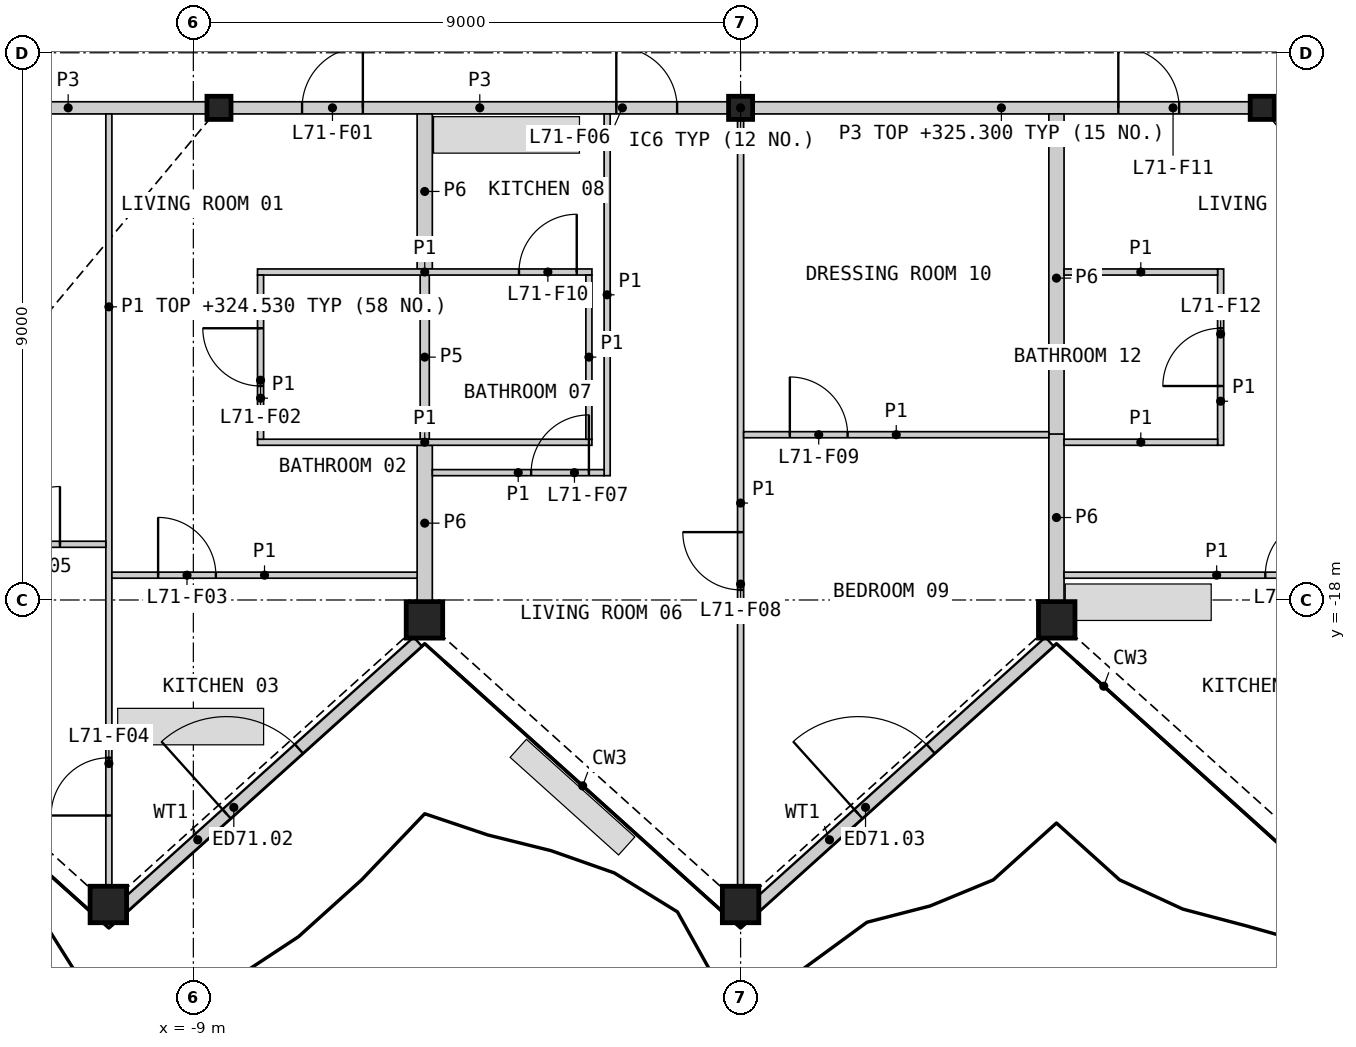
"""IFC4 building model, lengths in metres.
Left out: names, types, materials, properties, quantities, classifications, styles, units other than length and angle.
Written with IfcOpenShell. Run it as: python <this file> out.ifc"""

import sys

from ifc_helpers import new_model, si_unit, direction, frame, frame_2d, origin, origin_2d, place, context, subcontext, project, spatial, rectangle, hollow_rectangle, i_section, extrude, element, fill, save


model = new_model("IFC4")
c1 = context("Model", 3, precision=1e-05, world=origin(), true_north=direction((0.0, 1.0)))
c2 = subcontext(c1, "Body", "Model", "MODEL_VIEW")
j1 = project(units=[si_unit("LENGTHUNIT", "METRE"), si_unit("PLANEANGLEUNIT", "RADIAN")], contexts=[c1])
p1 = place(None, origin())
s1 = spatial("IfcSite", under=j1, at=p1, CompositionType="ELEMENT")
p2 = place(p1, origin())
s2 = spatial("IfcBuilding", under=s1, at=p2, CompositionType="ELEMENT")
p3 = place(p2, frame((0.0, 0.0, 322.2)))
s3 = spatial("IfcBuildingStorey", under=s2, at=p3, CompositionType="ELEMENT", Elevation=322.2)
for number, where, z_axis, x_axis in (
    (1, (-10.398, -23.008, 0.0), (0.0, 0.0, 1.0), (1.0, 0.0, 0.0)),
    (2, (-5.199, -18.327, 0.0), (0.0, 0.0, 1.0), (1.0, 0.0, 0.0)),
    (3, (0.0, -23.008, 0.0), (0.0, 0.0, 1.0), (1.0, 0.0, 0.0)),
    (4, (5.199, -18.327, 0.0), (0.0, 0.0, 1.0), (1.0, 0.0, 0.0)),
):
    element("IfcColumn", number, at=place(p3, frame(where, z_axis=z_axis, x_axis=x_axis)), inside=s3, PredefinedType="COLUMN", context=c2, shape_type="SweptSolid", body=[
        extrude(hollow_rectangle(XDim=0.6, YDim=0.6, WallThickness=0.04, at=origin_2d()), origin(), (0.0, 0.0, 1.0), 3.4),
    ])
for number, where, z_axis, x_axis in (
    (5, (-8.578, -9.906, 0.0), (0.0, 0.0, 1.0), (1.0, 0.0, 0.0)),
    (6, (0.0, -9.906, 0.0), (0.0, 0.0, 1.0), (1.0, 0.0, 0.0)),
    (7, (8.578, -9.906, 0.0), (0.0, 0.0, 1.0), (1.0, 0.0, 0.0)),
):
    element("IfcColumn", number, at=place(p3, frame(where, z_axis=z_axis, x_axis=x_axis)), inside=s3, PredefinedType="COLUMN", context=c2, shape_type="SweptSolid", body=[
        extrude(i_section(OverallWidth=0.396, OverallDepth=0.381, WebThickness=0.019, FlangeThickness=0.03, at=origin_2d()), origin(), (0.0, 0.0, 1.0), 3.4),
    ])
p4 = place(p3, frame((-10.134, -23.031, 0.0), z_axis=(0.0, 0.0, 1.0), x_axis=(0.743138937876, 0.669137145145, 0.0)))
e8 = element("IfcWall", 8, at=p4, inside=s3, PredefinedType="SOLIDWALL", context=c2, shape_type="SweptSolid", body=[
    extrude(rectangle(XDim=6.493, YDim=0.2, at=frame_2d((3.246, 0.0))), origin(), (0.0, 0.0, 1.0), 2.488),
])
p5 = place(p4, frame((2.261, 0.0, 0.0)))
e9 = element("IfcOpeningElement", 9, at=p5, cuts=e8, PredefinedType="OPENING", context=c2, shape_type="SweptSolid", body=[
    extrude(rectangle(XDim=1.6, YDim=2.25, at=frame_2d((0.8, 1.125))), frame((0.0, 0.11, 0.0), z_axis=(0.0, -1.0, 0.0), x_axis=(1.0, 0.0, 0.0)), (0.0, 0.0, 1.0), 0.22),
])
p6 = place(p3, frame((0.256, -23.031, 0.0), z_axis=(0.0, 0.0, 1.0), x_axis=(0.743138937876, 0.669137145145, 0.0)))
e10 = element("IfcWall", 10, at=p6, inside=s3, PredefinedType="SOLIDWALL", context=c2, shape_type="SweptSolid", body=[
    extrude(rectangle(XDim=6.493, YDim=0.2, at=frame_2d((3.246, 0.0))), origin(), (0.0, 0.0, 1.0), 2.488),
])
p7 = place(p6, frame((2.261, 0.0, 0.0)))
e11 = element("IfcOpeningElement", 11, at=p7, cuts=e10, PredefinedType="OPENING", context=c2, shape_type="SweptSolid", body=[
    extrude(rectangle(XDim=1.6, YDim=2.25, at=frame_2d((0.8, 1.125))), frame((0.0, 0.11, 0.0), z_axis=(0.0, -1.0, 0.0), x_axis=(1.0, 0.0, 0.0)), (0.0, 0.0, 1.0), 0.22),
])
p8 = place(p3, frame((0.208, -9.906, 0.0), z_axis=(0.0, 0.0, 1.0), x_axis=(1.0, 0.0, 0.0)))
e12 = element("IfcWall", 12, at=p8, inside=s3, PredefinedType="PARTITIONING", context=c2, shape_type="SweptSolid", body=[
    extrude(rectangle(XDim=8.163, YDim=0.2, at=frame_2d((4.082, 0.0))), origin(), (0.0, 0.0, 1.0), 3.1),
])
p9 = place(p8, frame((6.004, 0.0, 0.0)))
e13 = element("IfcOpeningElement", 13, at=p9, cuts=e12, PredefinedType="OPENING", context=c2, shape_type="SweptSolid", body=[
    extrude(rectangle(XDim=1.0, YDim=2.1, at=frame_2d((0.5, 1.05))), frame((0.0, 0.11, 0.0), z_axis=(0.0, -1.0, 0.0), x_axis=(1.0, 0.0, 0.0)), (0.0, 0.0, 1.0), 0.22),
])
p10 = place(p3, frame((-8.371, -9.906, 0.0), z_axis=(0.0, 0.0, 1.0), x_axis=(1.0, 0.0, 0.0)))
e14 = element("IfcWall", 14, at=p10, inside=s3, PredefinedType="PARTITIONING", context=c2, shape_type="SweptSolid", body=[
    extrude(rectangle(XDim=8.163, YDim=0.2, at=frame_2d((4.082, 0.0))), origin(), (0.0, 0.0, 1.0), 3.1),
])
p11 = place(p10, frame((1.159, 0.0, 0.0)))
e15 = element("IfcOpeningElement", 15, at=p11, cuts=e14, PredefinedType="OPENING", context=c2, shape_type="SweptSolid", body=[
    extrude(rectangle(XDim=1.0, YDim=2.1, at=frame_2d((0.5, 1.05))), frame((0.0, 0.11, 0.0), z_axis=(0.0, -1.0, 0.0), x_axis=(1.0, 0.0, 0.0)), (0.0, 0.0, 1.0), 0.22),
])
p12 = place(p10, frame((6.327, 0.0, 0.0)))
e16 = element("IfcOpeningElement", 16, at=p12, cuts=e14, PredefinedType="OPENING", context=c2, shape_type="SweptSolid", body=[
    extrude(rectangle(XDim=1.0, YDim=2.1, at=frame_2d((0.5, 1.05))), frame((0.0, 0.11, 0.0), z_axis=(0.0, -1.0, 0.0), x_axis=(1.0, 0.0, 0.0)), (0.0, 0.0, 1.0), 0.22),
])
p13 = place(p3, frame((5.195, -15.407, 0.0), z_axis=(0.0, 0.0, 1.0), x_axis=(0.0, 1.0, 0.0)))
e17 = element("IfcWall", 17, at=p13, inside=s3, PredefinedType="PARTITIONING", context=c2, shape_type="SweptSolid", body=[
    extrude(rectangle(XDim=5.401, YDim=0.25, at=frame_2d((2.701, 0.0))), origin(), (0.0, 0.0, 1.0), 2.33),
])
for number, where, z_axis, x_axis in (
    (18, (-13.331, -9.906, 0.0), (0.0, 0.0, 1.0), (1.0, 0.0, 0.0)),
    (19, (8.786, -9.906, 0.0), (0.0, 0.0, 1.0), (1.0, 0.0, 0.0)),
):
    element("IfcWall", number, at=place(p3, frame(where, z_axis=z_axis, x_axis=x_axis)), inside=s3, PredefinedType="PARTITIONING", context=c2, shape_type="SweptSolid", body=[
        extrude(rectangle(XDim=4.545, YDim=0.2, at=frame_2d((2.272, 0.0))), origin(), (0.0, 0.0, 1.0), 3.1),
    ])
p14 = place(p3, frame((-5.195, -12.556, 0.0), z_axis=(0.0, 0.0, 1.0), x_axis=(0.0, 1.0, 0.0)))
e20 = element("IfcWall", 20, at=p14, inside=s3, PredefinedType="PARTITIONING", context=c2, shape_type="SweptSolid", body=[
    extrude(rectangle(XDim=2.55, YDim=0.25, at=frame_2d((1.275, 0.0))), origin(), (0.0, 0.0, 1.0), 2.33),
])
p15 = place(p3, frame((5.195, -18.017, 0.0), z_axis=(0.0, 0.0, 1.0), x_axis=(0.0, 1.0, 0.0)))
e21 = element("IfcWall", 21, at=p15, inside=s3, PredefinedType="PARTITIONING", context=c2, shape_type="SweptSolid", body=[
    extrude(rectangle(XDim=2.746, YDim=0.25, at=frame_2d((1.373, 0.0))), origin(), (0.0, 0.0, 1.0), 2.33),
])
p16 = place(p3, frame((-5.195, -18.017, 0.0), z_axis=(0.0, 0.0, 1.0), x_axis=(0.0, 1.0, 0.0)))
e22 = element("IfcWall", 22, at=p16, inside=s3, PredefinedType="PARTITIONING", context=c2, shape_type="SweptSolid", body=[
    extrude(rectangle(XDim=2.561, YDim=0.25, at=frame_2d((1.281, 0.0))), origin(), (0.0, 0.0, 1.0), 2.33),
])
p17 = place(p3, frame((-5.195, -15.356, 0.0), z_axis=(0.0, 0.0, 1.0), x_axis=(0.0, 1.0, 0.0)))
e23 = element("IfcWall", 23, at=p17, inside=s3, PredefinedType="PLUMBINGWALL", context=c2, shape_type="SweptSolid", body=[
    extrude(rectangle(XDim=2.7, YDim=0.15, at=frame_2d((1.35, 0.0))), origin(), (0.0, 0.0, 1.0), 2.33),
])
p18 = place(p3, frame((-10.389, -22.698, 0.0), z_axis=(0.0, 0.0, 1.0), x_axis=(0.0, 1.0, 0.0)))
e24 = element("IfcWall", 24, at=p18, inside=s3, PredefinedType="PARTITIONING", context=c2, shape_type="SweptSolid", body=[
    extrude(rectangle(XDim=12.692, YDim=0.1, at=frame_2d((6.346, 0.0))), origin(), (0.0, 0.0, 1.0), 2.33),
])
p19 = place(p18, frame((1.153, 0.0, 0.0)))
e25 = element("IfcOpeningElement", 25, at=p19, cuts=e24, PredefinedType="OPENING", context=c2, shape_type="SweptSolid", body=[
    extrude(rectangle(XDim=0.95, YDim=2.1, at=frame_2d((0.475, 1.05))), frame((0.0, 0.06, 0.0), z_axis=(0.0, -1.0, 0.0), x_axis=(1.0, 0.0, 0.0)), (0.0, 0.0, 1.0), 0.12),
])
p20 = place(p3, frame((0.0, -22.698, 0.0), z_axis=(0.0, 0.0, 1.0), x_axis=(0.0, 1.0, 0.0)))
e26 = element("IfcWall", 26, at=p20, inside=s3, PredefinedType="PARTITIONING", context=c2, shape_type="SweptSolid", body=[
    extrude(rectangle(XDim=12.585, YDim=0.1, at=frame_2d((6.292, 0.0))), origin(), (0.0, 0.0, 1.0), 2.33),
])
p21 = place(p20, frame((4.865, 0.0, 0.0)))
e27 = element("IfcOpeningElement", 27, at=p21, cuts=e26, PredefinedType="OPENING", context=c2, shape_type="SweptSolid", body=[
    extrude(rectangle(XDim=0.95, YDim=2.1, at=frame_2d((0.475, 1.05))), frame((0.0, 0.06, 0.0), z_axis=(0.0, -1.0, 0.0), x_axis=(1.0, 0.0, 0.0)), (0.0, 0.0, 1.0), 0.12),
])
p22 = place(p3, frame((-17.132, -17.084, 0.0), z_axis=(0.0, 0.0, 1.0), x_axis=(1.0, 0.0, 0.0)))
e28 = element("IfcWall", 28, at=p22, inside=s3, PredefinedType="PARTITIONING", context=c2, shape_type="SweptSolid", body=[
    extrude(rectangle(XDim=6.693, YDim=0.1, at=frame_2d((3.346, 0.0))), origin(), (0.0, 0.0, 1.0), 2.33),
])
p23 = place(p22, frame((4.989, 0.0, 0.0)))
e29 = element("IfcOpeningElement", 29, at=p23, cuts=e28, PredefinedType="OPENING", context=c2, shape_type="SweptSolid", body=[
    extrude(rectangle(XDim=0.95, YDim=2.1, at=frame_2d((0.475, 1.05))), frame((0.0, 0.06, 0.0), z_axis=(0.0, -1.0, 0.0), x_axis=(1.0, 0.0, 0.0)), (0.0, 0.0, 1.0), 0.12),
])
p24 = place(p3, frame((-2.195, -15.956, 0.0), z_axis=(0.0, 0.0, 1.0), x_axis=(0.0, 1.0, 0.0)))
e30 = element("IfcWall", 30, at=p24, inside=s3, PredefinedType="PARTITIONING", context=c2, shape_type="SweptSolid", body=[
    extrude(rectangle(XDim=5.95, YDim=0.1, at=frame_2d((2.975, 0.0))), origin(), (0.0, 0.0, 1.0), 2.33),
])
p25 = place(p3, frame((-7.945, -12.606, 0.0), z_axis=(0.0, 0.0, 1.0), x_axis=(1.0, 0.0, 0.0)))
e31 = element("IfcWall", 31, at=p25, inside=s3, PredefinedType="PARTITIONING", context=c2, shape_type="SweptSolid", body=[
    extrude(rectangle(XDim=5.5, YDim=0.1, at=frame_2d((2.75, 0.0))), origin(), (0.0, 0.0, 1.0), 2.33),
])
p26 = place(p25, frame((4.3, 0.0, 0.0)))
e32 = element("IfcOpeningElement", 32, at=p26, cuts=e31, PredefinedType="OPENING", context=c2, shape_type="SweptSolid", body=[
    extrude(rectangle(XDim=0.95, YDim=2.1, at=frame_2d((0.475, 1.05))), frame((0.0, 0.06, 0.0), z_axis=(0.0, -1.0, 0.0), x_axis=(1.0, 0.0, 0.0)), (0.0, 0.0, 1.0), 0.12),
])
p27 = place(p3, frame((-7.945, -15.406, 0.0), z_axis=(0.0, 0.0, 1.0), x_axis=(1.0, 0.0, 0.0)))
e33 = element("IfcWall", 33, at=p27, inside=s3, PredefinedType="PARTITIONING", context=c2, shape_type="SweptSolid", body=[
    extrude(rectangle(XDim=5.5, YDim=0.1, at=frame_2d((2.75, 0.0))), origin(), (0.0, 0.0, 1.0), 2.33),
])
p28 = place(p3, frame((-10.339, -17.592, 0.0), z_axis=(0.0, 0.0, 1.0), x_axis=(1.0, 0.0, 0.0)))
e34 = element("IfcWall", 34, at=p28, inside=s3, PredefinedType="PARTITIONING", context=c2, shape_type="SweptSolid", body=[
    extrude(rectangle(XDim=5.02, YDim=0.1, at=frame_2d((2.51, 0.0))), origin(), (0.0, 0.0, 1.0), 2.33),
])
p29 = place(p28, frame((0.76, 0.0, 0.0)))
e35 = element("IfcOpeningElement", 35, at=p29, cuts=e34, PredefinedType="OPENING", context=c2, shape_type="SweptSolid", body=[
    extrude(rectangle(XDim=0.95, YDim=2.1, at=frame_2d((0.475, 1.05))), frame((0.0, 0.06, 0.0), z_axis=(0.0, -1.0, 0.0), x_axis=(1.0, 0.0, 0.0)), (0.0, 0.0, 1.0), 0.12),
])
p30 = place(p3, frame((5.32, -17.592, 0.0), z_axis=(0.0, 0.0, 1.0), x_axis=(1.0, 0.0, 0.0)))
e36 = element("IfcWall", 36, at=p30, inside=s3, PredefinedType="PARTITIONING", context=c2, shape_type="SweptSolid", body=[
    extrude(rectangle(XDim=5.02, YDim=0.1, at=frame_2d((2.51, 0.0))), origin(), (0.0, 0.0, 1.0), 2.33),
])
p31 = place(p30, frame((3.31, 0.0, 0.0)))
e37 = element("IfcOpeningElement", 37, at=p31, cuts=e36, PredefinedType="OPENING", context=c2, shape_type="SweptSolid", body=[
    extrude(rectangle(XDim=0.95, YDim=2.1, at=frame_2d((0.475, 1.05))), frame((0.0, 0.06, 0.0), z_axis=(0.0, -1.0, 0.0), x_axis=(1.0, 0.0, 0.0)), (0.0, 0.0, 1.0), 0.12),
])
p32 = place(p3, frame((0.05, -15.282, 0.0), z_axis=(0.0, 0.0, 1.0), x_axis=(1.0, 0.0, 0.0)))
e38 = element("IfcWall", 38, at=p32, inside=s3, PredefinedType="PARTITIONING", context=c2, shape_type="SweptSolid", body=[
    extrude(rectangle(XDim=5.02, YDim=0.1, at=frame_2d((2.51, 0.0))), origin(), (0.0, 0.0, 1.0), 2.33),
])
p33 = place(p32, frame((0.76, 0.0, 0.0)))
e39 = element("IfcOpeningElement", 39, at=p33, cuts=e38, PredefinedType="OPENING", context=c2, shape_type="SweptSolid", body=[
    extrude(rectangle(XDim=0.95, YDim=2.1, at=frame_2d((0.475, 1.05))), frame((0.0, 0.06, 0.0), z_axis=(0.0, -1.0, 0.0), x_axis=(1.0, 0.0, 0.0)), (0.0, 0.0, 1.0), 0.12),
])
p34 = place(p3, frame((-5.07, -15.906, 0.0), z_axis=(0.0, 0.0, 1.0), x_axis=(1.0, 0.0, 0.0)))
e40 = element("IfcWall", 40, at=p34, inside=s3, PredefinedType="PARTITIONING", context=c2, shape_type="SweptSolid", body=[
    extrude(rectangle(XDim=2.825, YDim=0.1, at=frame_2d((1.413, 0.0))), origin(), (0.0, 0.0, 1.0), 2.33),
])
p35 = place(p34, frame((1.625, 0.0, 0.0)))
e41 = element("IfcOpeningElement", 41, at=p35, cuts=e40, PredefinedType="OPENING", context=c2, shape_type="SweptSolid", body=[
    extrude(rectangle(XDim=0.95, YDim=2.1, at=frame_2d((0.475, 1.05))), frame((0.0, 0.06, 0.0), z_axis=(0.0, -1.0, 0.0), x_axis=(1.0, 0.0, 0.0)), (0.0, 0.0, 1.0), 0.12),
])
p36 = place(p3, frame((-7.895, -15.356, 0.0), z_axis=(0.0, 0.0, 1.0), x_axis=(0.0, 1.0, 0.0)))
e42 = element("IfcWall", 42, at=p36, inside=s3, PredefinedType="PARTITIONING", context=c2, shape_type="SweptSolid", body=[
    extrude(rectangle(XDim=2.7, YDim=0.1, at=frame_2d((1.35, 0.0))), origin(), (0.0, 0.0, 1.0), 2.33),
])
p37 = place(p36, frame((0.875, 0.0, 0.0)))
e43 = element("IfcOpeningElement", 43, at=p37, cuts=e42, PredefinedType="OPENING", context=c2, shape_type="SweptSolid", body=[
    extrude(rectangle(XDim=0.95, YDim=2.1, at=frame_2d((0.475, 1.05))), frame((0.0, 0.06, 0.0), z_axis=(0.0, -1.0, 0.0), x_axis=(1.0, 0.0, 0.0)), (0.0, 0.0, 1.0), 0.12),
])
p38 = place(p3, frame((-2.495, -15.356, 0.0), z_axis=(0.0, 0.0, 1.0), x_axis=(0.0, 1.0, 0.0)))
e44 = element("IfcWall", 44, at=p38, inside=s3, PredefinedType="PARTITIONING", context=c2, shape_type="SweptSolid", body=[
    extrude(rectangle(XDim=2.7, YDim=0.1, at=frame_2d((1.35, 0.0))), origin(), (0.0, 0.0, 1.0), 2.33),
])
p39 = place(p3, frame((7.895, -15.456, 0.0), z_axis=(0.0, 0.0, 1.0), x_axis=(0.0, 1.0, 0.0)))
e45 = element("IfcWall", 45, at=p39, inside=s3, PredefinedType="PARTITIONING", context=c2, shape_type="SweptSolid", body=[
    extrude(rectangle(XDim=2.9, YDim=0.1, at=frame_2d((1.45, 0.0))), origin(), (0.0, 0.0, 1.0), 2.33),
])
p40 = place(p39, frame((0.975, 0.0, 0.0)))
e46 = element("IfcOpeningElement", 46, at=p40, cuts=e45, PredefinedType="OPENING", context=c2, shape_type="SweptSolid", body=[
    extrude(rectangle(XDim=0.95, YDim=2.1, at=frame_2d((0.475, 1.05))), frame((0.0, 0.06, 0.0), z_axis=(0.0, -1.0, 0.0), x_axis=(1.0, 0.0, 0.0)), (0.0, 0.0, 1.0), 0.12),
])
for number, where, z_axis, x_axis in (
    (47, (5.32, -12.606, 0.0), (0.0, 0.0, 1.0), (1.0, 0.0, 0.0)),
    (48, (5.32, -15.406, 0.0), (0.0, 0.0, 1.0), (1.0, 0.0, 0.0)),
):
    element("IfcWall", number, at=place(p3, frame(where, z_axis=z_axis, x_axis=x_axis)), inside=s3, PredefinedType="PARTITIONING", context=c2, shape_type="SweptSolid", body=[
        extrude(rectangle(XDim=2.525, YDim=0.1, at=frame_2d((1.263, 0.0))), origin(), (0.0, 0.0, 1.0), 2.33),
    ])
p41 = place(p5, origin())
e49 = element("IfcDoor", 49, at=p41, inside=s3, OperationType="DOUBLE_DOOR_SINGLE_SWING", PredefinedType="DOOR", context=c2, shape_type="SweptSolid", body=[
    extrude(rectangle(XDim=1.6, YDim=2.25, at=frame_2d((0.8, 1.125))), frame((0.0, 0.025, 0.0), z_axis=(0.0, -1.0, 0.0), x_axis=(1.0, 0.0, 0.0)), (0.0, 0.0, 1.0), 0.05),
])
fill(e9, e49)
p42 = place(p7, origin())
e50 = element("IfcDoor", 50, at=p42, inside=s3, OperationType="DOUBLE_DOOR_SINGLE_SWING", PredefinedType="DOOR", context=c2, shape_type="SweptSolid", body=[
    extrude(rectangle(XDim=1.6, YDim=2.25, at=frame_2d((0.8, 1.125))), frame((0.0, 0.025, 0.0), z_axis=(0.0, -1.0, 0.0), x_axis=(1.0, 0.0, 0.0)), (0.0, 0.0, 1.0), 0.05),
])
fill(e11, e50)
p43 = place(p11, origin())
e51 = element("IfcDoor", 51, at=p43, inside=s3, OperationType="SINGLE_SWING_RIGHT", PredefinedType="DOOR", context=c2, shape_type="SweptSolid", body=[
    extrude(rectangle(XDim=1.0, YDim=2.1, at=frame_2d((0.5, 1.05))), frame((0.0, 0.025, 0.0), z_axis=(0.0, -1.0, 0.0), x_axis=(1.0, 0.0, 0.0)), (0.0, 0.0, 1.0), 0.05),
])
fill(e15, e51)
p44 = place(p37, origin())
e52 = element("IfcDoor", 52, at=p44, inside=s3, OperationType="SINGLE_SWING_RIGHT", PredefinedType="DOOR", context=c2, shape_type="SweptSolid", body=[
    extrude(rectangle(XDim=0.95, YDim=2.1, at=frame_2d((0.475, 1.05))), frame((0.0, 0.025, 0.0), z_axis=(0.0, -1.0, 0.0), x_axis=(1.0, 0.0, 0.0)), (0.0, 0.0, 1.0), 0.05),
])
fill(e43, e52)
p45 = place(p29, origin())
e53 = element("IfcDoor", 53, at=p45, inside=s3, OperationType="SINGLE_SWING_LEFT", PredefinedType="DOOR", context=c2, shape_type="SweptSolid", body=[
    extrude(rectangle(XDim=0.95, YDim=2.1, at=frame_2d((0.475, 1.05))), frame((0.0, 0.025, 0.0), z_axis=(0.0, -1.0, 0.0), x_axis=(1.0, 0.0, 0.0)), (0.0, 0.0, 1.0), 0.05),
])
fill(e35, e53)
p46 = place(p19, origin())
e54 = element("IfcDoor", 54, at=p46, inside=s3, OperationType="SINGLE_SWING_LEFT", PredefinedType="DOOR", context=c2, shape_type="SweptSolid", body=[
    extrude(rectangle(XDim=0.95, YDim=2.1, at=frame_2d((0.475, 1.05))), frame((0.0, 0.025, 0.0), z_axis=(0.0, -1.0, 0.0), x_axis=(1.0, 0.0, 0.0)), (0.0, 0.0, 1.0), 0.05),
])
fill(e25, e54)
p47 = place(p23, origin())
e55 = element("IfcDoor", 55, at=p47, inside=s3, OperationType="SINGLE_SWING_RIGHT", PredefinedType="DOOR", context=c2, shape_type="SweptSolid", body=[
    extrude(rectangle(XDim=0.95, YDim=2.1, at=frame_2d((0.475, 1.05))), frame((0.0, 0.025, 0.0), z_axis=(0.0, -1.0, 0.0), x_axis=(1.0, 0.0, 0.0)), (0.0, 0.0, 1.0), 0.05),
])
fill(e29, e55)
p48 = place(p12, origin())
e56 = element("IfcDoor", 56, at=p48, inside=s3, OperationType="SINGLE_SWING_LEFT", PredefinedType="DOOR", context=c2, shape_type="SweptSolid", body=[
    extrude(rectangle(XDim=1.0, YDim=2.1, at=frame_2d((0.5, 1.05))), frame((0.0, 0.025, 0.0), z_axis=(0.0, -1.0, 0.0), x_axis=(1.0, 0.0, 0.0)), (0.0, 0.0, 1.0), 0.05),
])
fill(e16, e56)
p49 = place(p35, origin())
e57 = element("IfcDoor", 57, at=p49, inside=s3, OperationType="SINGLE_SWING_RIGHT", PredefinedType="DOOR", context=c2, shape_type="SweptSolid", body=[
    extrude(rectangle(XDim=0.95, YDim=2.1, at=frame_2d((0.475, 1.05))), frame((0.0, 0.025, 0.0), z_axis=(0.0, -1.0, 0.0), x_axis=(1.0, 0.0, 0.0)), (0.0, 0.0, 1.0), 0.05),
])
fill(e41, e57)
p50 = place(p21, origin())
e58 = element("IfcDoor", 58, at=p50, inside=s3, OperationType="SINGLE_SWING_RIGHT", PredefinedType="DOOR", context=c2, shape_type="SweptSolid", body=[
    extrude(rectangle(XDim=0.95, YDim=2.1, at=frame_2d((0.475, 1.05))), frame((0.0, 0.025, 0.0), z_axis=(0.0, -1.0, 0.0), x_axis=(1.0, 0.0, 0.0)), (0.0, 0.0, 1.0), 0.05),
])
fill(e27, e58)
p51 = place(p33, origin())
e59 = element("IfcDoor", 59, at=p51, inside=s3, OperationType="SINGLE_SWING_LEFT", PredefinedType="DOOR", context=c2, shape_type="SweptSolid", body=[
    extrude(rectangle(XDim=0.95, YDim=2.1, at=frame_2d((0.475, 1.05))), frame((0.0, 0.025, 0.0), z_axis=(0.0, -1.0, 0.0), x_axis=(1.0, 0.0, 0.0)), (0.0, 0.0, 1.0), 0.05),
])
fill(e39, e59)
p52 = place(p26, origin())
e60 = element("IfcDoor", 60, at=p52, inside=s3, OperationType="SINGLE_SWING_RIGHT", PredefinedType="DOOR", context=c2, shape_type="SweptSolid", body=[
    extrude(rectangle(XDim=0.95, YDim=2.1, at=frame_2d((0.475, 1.05))), frame((0.0, 0.025, 0.0), z_axis=(0.0, -1.0, 0.0), x_axis=(1.0, 0.0, 0.0)), (0.0, 0.0, 1.0), 0.05),
])
fill(e32, e60)
p53 = place(p9, origin())
e61 = element("IfcDoor", 61, at=p53, inside=s3, OperationType="SINGLE_SWING_LEFT", PredefinedType="DOOR", context=c2, shape_type="SweptSolid", body=[
    extrude(rectangle(XDim=1.0, YDim=2.1, at=frame_2d((0.5, 1.05))), frame((0.0, 0.025, 0.0), z_axis=(0.0, -1.0, 0.0), x_axis=(1.0, 0.0, 0.0)), (0.0, 0.0, 1.0), 0.05),
])
fill(e13, e61)
p54 = place(p40, origin())
e62 = element("IfcDoor", 62, at=p54, inside=s3, OperationType="SINGLE_SWING_LEFT", PredefinedType="DOOR", context=c2, shape_type="SweptSolid", body=[
    extrude(rectangle(XDim=0.95, YDim=2.1, at=frame_2d((0.475, 1.05))), frame((0.0, 0.025, 0.0), z_axis=(0.0, -1.0, 0.0), x_axis=(1.0, 0.0, 0.0)), (0.0, 0.0, 1.0), 0.05),
])
fill(e46, e62)
p55 = place(p31, origin())
e63 = element("IfcDoor", 63, at=p55, inside=s3, OperationType="SINGLE_SWING_RIGHT", PredefinedType="DOOR", context=c2, shape_type="SweptSolid", body=[
    extrude(rectangle(XDim=0.95, YDim=2.1, at=frame_2d((0.475, 1.05))), frame((0.0, 0.025, 0.0), z_axis=(0.0, -1.0, 0.0), x_axis=(1.0, 0.0, 0.0)), (0.0, 0.0, 1.0), 0.05),
])
fill(e37, e63)
save(model, sys.argv[1])
